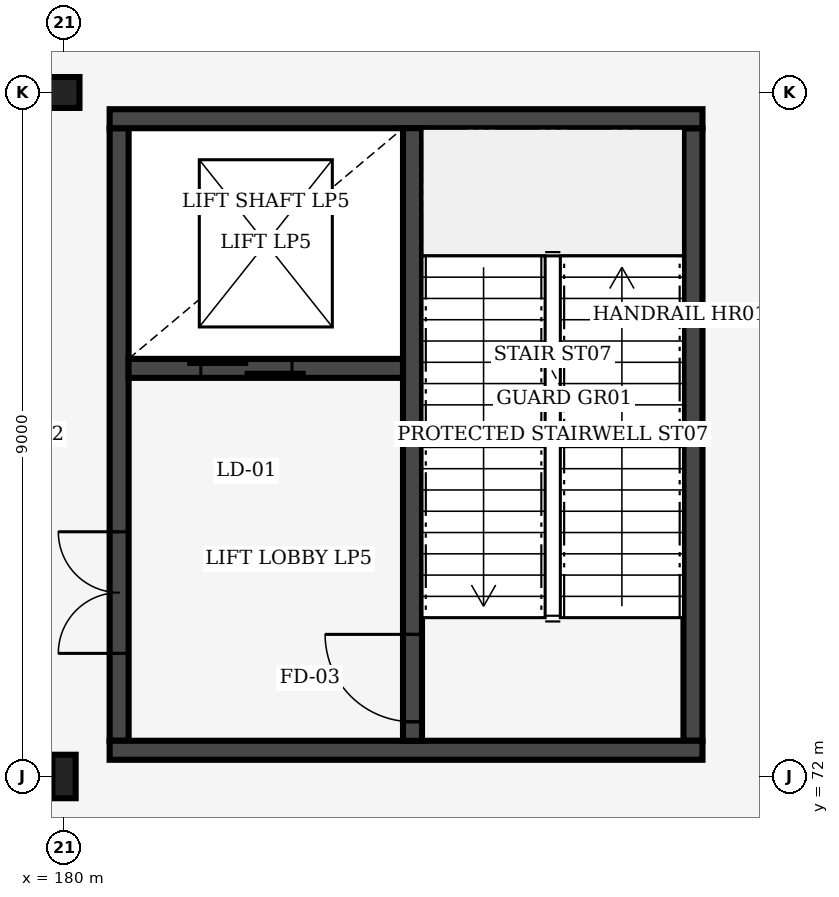
"""IFC4 building model, lengths in metres.
Left out: names, types, materials, properties, quantities, classifications, styles, units other than length and angle.
Written with IfcOpenShell. Run it as: python <this file> out.ifc"""

import sys

from ifc_helpers import new_model, si_unit, direction, frame, frame_2d, origin, origin_2d, place, context, subcontext, project, spatial, rectangle, hollow_circle, i_section, extrude, element, fill, save


model = new_model("IFC4")
c1 = context("Model", 3, precision=1e-05, world=origin(), true_north=direction((0.0, 1.0)))
c2 = subcontext(c1, "Body", "Model", "MODEL_VIEW")
j1 = project(units=[si_unit("LENGTHUNIT", "METRE"), si_unit("PLANEANGLEUNIT", "RADIAN")], contexts=[c1])
p1 = place(None, origin())
s1 = spatial("IfcSite", under=j1, at=p1, CompositionType="ELEMENT")
p2 = place(p1, origin())
s2 = spatial("IfcBuilding", under=s1, at=p2, CompositionType="ELEMENT")
p3 = place(p2, frame((0.0, 0.0, 12.0)))
s3 = spatial("IfcBuildingStorey", under=s2, at=p3, CompositionType="ELEMENT", Elevation=12.0)
p4 = place(p3, frame((180.0, 72.0, 0.0), z_axis=(0.0, 0.0, 1.0), x_axis=(1.0, 0.0, 0.0)))
e1 = element("IfcColumn", 1, at=p4, inside=s3, PredefinedType="COLUMN", context=c2, shape_type="SweptSolid", body=[
    extrude(i_section(OverallWidth=0.306, OverallDepth=0.572, WebThickness=0.021, FlangeThickness=0.04, FilletRadius=0.027, at=origin_2d()), origin(), (0.0, 0.0, 1.0), 6.0),
])
p5 = place(p3, frame((180.0, 81.0, 0.0), z_axis=(0.0, 0.0, 1.0), x_axis=(1.0, 0.0, 0.0)))
e2 = element("IfcColumn", 2, at=p5, inside=s3, PredefinedType="COLUMN", context=c2, shape_type="SweptSolid", body=[
    extrude(hollow_circle(Radius=0.203, WallThickness=0.016, at=origin_2d()), origin(), (0.0, 0.0, 1.0), 6.0),
])
p6 = place(p3, frame((180.725, 72.47, 0.0), z_axis=(0.0, 0.0, 1.0), x_axis=(0.0, 1.0, 0.0)))
e3 = element("IfcWall", 3, at=p6, inside=s3, PredefinedType="SHEAR", context=c2, shape_type="SweptSolid", body=[
    extrude(rectangle(XDim=8.06, YDim=0.25, at=frame_2d((4.03, 0.0))), origin(), (0.0, 0.0, 1.0), 5.64),
])
p7 = place(p6, frame((1.15, 0.0, 0.0)))
e4 = element("IfcOpeningElement", 4, at=p7, cuts=e3, PredefinedType="OPENING", context=c2, shape_type="SweptSolid", body=[
    extrude(rectangle(XDim=1.6, YDim=2.2, at=frame_2d((0.8, 1.1))), frame((0.0, 0.135, 0.0), z_axis=(0.0, -1.0, 0.0), x_axis=(1.0, 0.0, 0.0)), (0.0, 0.0, 1.0), 0.27),
])
p8 = place(p3, frame((188.275, 72.47, 0.0), z_axis=(0.0, 0.0, 1.0), x_axis=(0.0, 1.0, 0.0)))
e5 = element("IfcWall", 5, at=p8, inside=s3, PredefinedType="SHEAR", context=c2, shape_type="SweptSolid", body=[
    extrude(rectangle(XDim=8.06, YDim=0.25, at=frame_2d((4.03, 0.0))), origin(), (0.0, 0.0, 1.0), 5.64),
])
for number, where, z_axis, x_axis in (
    (6, (180.6, 72.345, 0.0), (0.0, 0.0, 1.0), (1.0, 0.0, 0.0)),
    (7, (180.6, 80.655, 0.0), (0.0, 0.0, 1.0), (1.0, 0.0, 0.0)),
):
    element("IfcWall", number, at=place(p3, frame(where, z_axis=z_axis, x_axis=x_axis)), inside=s3, PredefinedType="SHEAR", context=c2, shape_type="SweptSolid", body=[
        extrude(rectangle(XDim=7.8, YDim=0.25, at=frame_2d((3.9, 0.0))), origin(), (0.0, 0.0, 1.0), 5.64),
    ])
p9 = place(p3, frame((184.585, 72.47, 0.0), z_axis=(0.0, 0.0, 1.0), x_axis=(0.0, 1.0, 0.0)))
e8 = element("IfcWall", 8, at=p9, inside=s3, PredefinedType="SHEAR", context=c2, shape_type="SweptSolid", body=[
    extrude(rectangle(XDim=8.06, YDim=0.25, at=frame_2d((4.03, 0.0))), origin(), (0.0, 0.0, 1.0), 5.64),
])
p10 = place(p9, frame((0.25, 0.0, 0.0)))
e9 = element("IfcOpeningElement", 9, at=p10, cuts=e8, PredefinedType="OPENING", context=c2, shape_type="SweptSolid", body=[
    extrude(rectangle(XDim=1.15, YDim=2.15, at=frame_2d((0.575, 1.075))), frame((0.0, 0.135, 0.0), z_axis=(0.0, -1.0, 0.0), x_axis=(1.0, 0.0, 0.0)), (0.0, 0.0, 1.0), 0.27),
])
p11 = place(p3, frame((180.85, 77.37, 0.0), z_axis=(0.0, 0.0, 1.0), x_axis=(1.0, 0.0, 0.0)))
e10 = element("IfcWall", 10, at=p11, inside=s3, PredefinedType="SHEAR", context=c2, shape_type="SweptSolid", body=[
    extrude(rectangle(XDim=3.61, YDim=0.25, at=frame_2d((1.805, 0.0))), origin(), (0.0, 0.0, 1.0), 5.64),
])
p12 = place(p11, frame((0.95, 0.0, 0.0)))
e11 = element("IfcOpeningElement", 11, at=p12, cuts=e10, PredefinedType="OPENING", context=c2, shape_type="SweptSolid", body=[
    extrude(rectangle(XDim=1.2, YDim=2.2, at=frame_2d((0.6, 1.1))), frame((0.0, 0.135, 0.0), z_axis=(0.0, -1.0, 0.0), x_axis=(1.0, 0.0, 0.0)), (0.0, 0.0, 1.0), 0.27),
])
p13 = place(p10, origin())
e12 = element("IfcDoor", 12, at=p13, inside=s3, OperationType="SINGLE_SWING_RIGHT", PredefinedType="DOOR", context=c2, shape_type="SweptSolid", body=[
    extrude(rectangle(XDim=1.15, YDim=2.15, at=frame_2d((0.575, 1.075))), frame((0.0, 0.025, 0.0), z_axis=(0.0, -1.0, 0.0), x_axis=(1.0, 0.0, 0.0)), (0.0, 0.0, 1.0), 0.05),
])
fill(e9, e12)
p14 = place(p12, origin())
e13 = element("IfcDoor", 13, at=p14, inside=s3, OperationType="DOUBLE_DOOR_SLIDING", PredefinedType="DOOR", context=c2, shape_type="SweptSolid", body=[
    extrude(rectangle(XDim=1.2, YDim=2.2, at=frame_2d((0.6, 1.1))), frame((0.0, 0.025, 0.0), z_axis=(0.0, -1.0, 0.0), x_axis=(1.0, 0.0, 0.0)), (0.0, 0.0, 1.0), 0.05),
])
fill(e11, e13)
p15 = place(p7, origin())
e14 = element("IfcDoor", 14, at=p15, inside=s3, OperationType="DOUBLE_DOOR_SINGLE_SWING", PredefinedType="DOOR", context=c2, shape_type="SweptSolid", body=[
    extrude(rectangle(XDim=1.6, YDim=2.2, at=frame_2d((0.8, 1.1))), frame((0.0, 0.025, 0.0), z_axis=(0.0, -1.0, 0.0), x_axis=(1.0, 0.0, 0.0)), (0.0, 0.0, 1.0), 0.05),
])
fill(e4, e14)
save(model, sys.argv[1])
